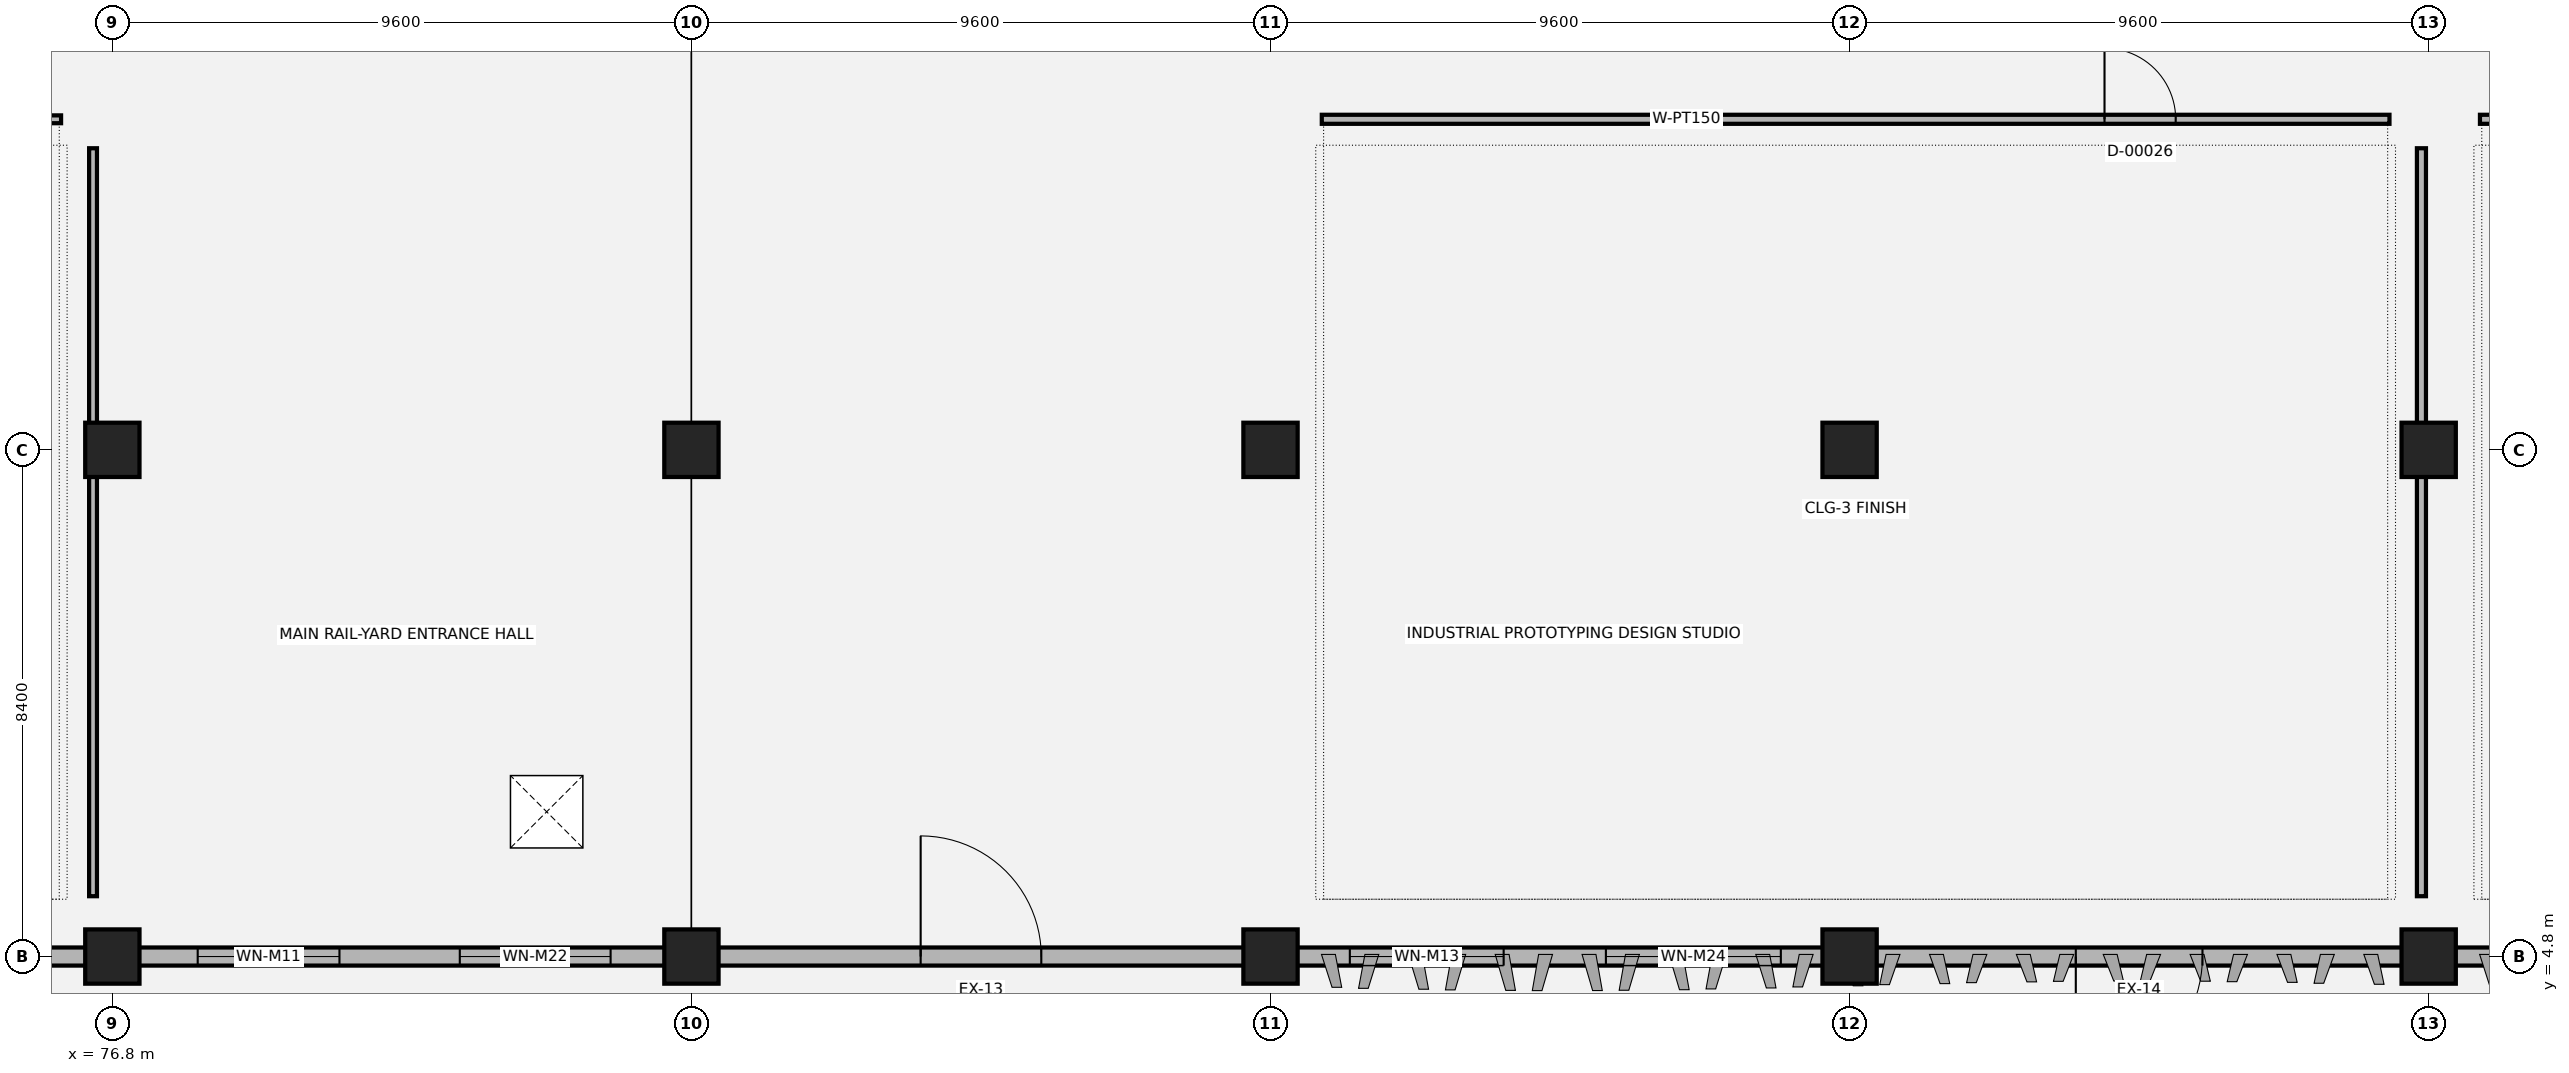
"""IFC4 building model, lengths in metres.
Left out: names, types, materials, properties, quantities, classifications, styles, units other than length and angle.
Written with IfcOpenShell. Run it as: python <this file> out.ifc"""

import sys

from ifc_helpers import new_model, si_unit, direction, frame, frame_2d, origin, origin_2d, place, context, subcontext, project, spatial, rectangle, extrude, element, fill, save


model = new_model("IFC4")
c1 = context("Model", 3, precision=1e-05, world=origin(), true_north=direction((0.0, 1.0)))
c2 = subcontext(c1, "Body", "Model", "MODEL_VIEW")
j1 = project(units=[si_unit("LENGTHUNIT", "METRE"), si_unit("PLANEANGLEUNIT", "RADIAN")], contexts=[c1])
p1 = place(None, origin())
s1 = spatial("IfcSite", under=j1, at=p1, CompositionType="ELEMENT")
p2 = place(p1, origin())
s2 = spatial("IfcBuilding", under=s1, at=p2, CompositionType="ELEMENT")
p3 = place(p2, origin())
s3 = spatial("IfcBuildingStorey", under=s2, at=p3, CompositionType="ELEMENT", Elevation=0.0)
for number, where, z_axis, x_axis in (
    (1, (76.8, 4.8, 0.0), (0.0, 0.0, 1.0), (1.0, 0.0, 0.0)),
    (2, (76.8, 13.2, 0.0), (0.0, 0.0, 1.0), (1.0, 0.0, 0.0)),
    (3, (86.4, 4.8, 0.0), (0.0, 0.0, 1.0), (1.0, 0.0, 0.0)),
    (4, (86.4, 13.2, 0.0), (0.0, 0.0, 1.0), (1.0, 0.0, 0.0)),
    (5, (96.0, 4.8, 0.0), (0.0, 0.0, 1.0), (1.0, 0.0, 0.0)),
    (6, (96.0, 13.2, 0.0), (0.0, 0.0, 1.0), (1.0, 0.0, 0.0)),
    (7, (105.6, 4.8, 0.0), (0.0, 0.0, 1.0), (1.0, 0.0, 0.0)),
    (8, (105.6, 13.2, 0.0), (0.0, 0.0, 1.0), (1.0, 0.0, 0.0)),
    (9, (115.2, 4.8, 0.0), (0.0, 0.0, 1.0), (1.0, 0.0, 0.0)),
    (10, (115.2, 13.2, 0.0), (0.0, 0.0, 1.0), (1.0, 0.0, 0.0)),
):
    element("IfcColumn", number, at=place(p3, frame(where, z_axis=z_axis, x_axis=x_axis)), inside=s3, PredefinedType="COLUMN", context=c2, shape_type="SweptSolid", body=[
        extrude(rectangle(XDim=0.9, YDim=0.9, at=origin_2d()), origin(), (0.0, 0.0, 1.0), 5.4),
    ])
p4 = place(p3, frame((67.58, 4.8, 0.0), z_axis=(0.0, 0.0, 1.0), x_axis=(1.0, 0.0, 0.0)))
e11 = element("IfcWall", 11, at=p4, inside=s3, PredefinedType="SOLIDWALL", context=c2, shape_type="SweptSolid", body=[
    extrude(rectangle(XDim=8.84, YDim=0.3, at=frame_2d((4.42, 0.0))), origin(), (0.0, 0.0, 1.0), 4.04),
])
p5 = place(p4, frame((3.37, 0.0, 0.0)))
e12 = element("IfcOpeningElement", 12, at=p5, cuts=e11, PredefinedType="OPENING", context=c2, shape_type="SweptSolid", body=[
    extrude(rectangle(XDim=2.1, YDim=2.2, at=frame_2d((1.05, 1.1))), frame((0.0, 0.16, 0.0), z_axis=(0.0, -1.0, 0.0), x_axis=(1.0, 0.0, 0.0)), (0.0, 0.0, 1.0), 0.32),
])
p6 = place(p3, frame((77.18, 4.8, 0.0), z_axis=(0.0, 0.0, 1.0), x_axis=(1.0, 0.0, 0.0)))
e13 = element("IfcWall", 13, at=p6, inside=s3, PredefinedType="SOLIDWALL", context=c2, shape_type="SweptSolid", body=[
    extrude(rectangle(XDim=8.84, YDim=0.3, at=frame_2d((4.42, 0.0))), origin(), (0.0, 0.0, 1.0), 4.04),
])
p7 = place(p6, frame((1.035, 0.0, 0.9)))
e14 = element("IfcOpeningElement", 14, at=p7, cuts=e13, PredefinedType="OPENING", context=c2, shape_type="SweptSolid", body=[
    extrude(rectangle(XDim=2.35, YDim=1.7, at=frame_2d((1.175, 0.85))), frame((0.0, 0.16, 0.0), z_axis=(0.0, -1.0, 0.0), x_axis=(1.0, 0.0, 0.0)), (0.0, 0.0, 1.0), 0.32),
])
p8 = place(p6, frame((5.38, 0.0, 0.9)))
e15 = element("IfcOpeningElement", 15, at=p8, cuts=e13, PredefinedType="OPENING", context=c2, shape_type="SweptSolid", body=[
    extrude(rectangle(XDim=2.5, YDim=1.65, at=frame_2d((1.25, 0.825))), frame((0.0, 0.16, 0.0), z_axis=(0.0, -1.0, 0.0), x_axis=(1.0, 0.0, 0.0)), (0.0, 0.0, 1.0), 0.32),
])
p9 = place(p3, frame((86.78, 4.8, 0.0), z_axis=(0.0, 0.0, 1.0), x_axis=(1.0, 0.0, 0.0)))
e16 = element("IfcWall", 16, at=p9, inside=s3, PredefinedType="SOLIDWALL", context=c2, shape_type="SweptSolid", body=[
    extrude(rectangle(XDim=8.84, YDim=0.3, at=frame_2d((4.42, 0.0))), origin(), (0.0, 0.0, 1.0), 4.04),
])
p10 = place(p9, frame((3.42, 0.0, 0.0)))
e17 = element("IfcOpeningElement", 17, at=p10, cuts=e16, PredefinedType="OPENING", context=c2, shape_type="SweptSolid", body=[
    extrude(rectangle(XDim=2.0, YDim=2.2, at=frame_2d((1.0, 1.1))), frame((0.0, 0.16, 0.0), z_axis=(0.0, -1.0, 0.0), x_axis=(1.0, 0.0, 0.0)), (0.0, 0.0, 1.0), 0.32),
])
p11 = place(p3, frame((96.38, 4.8, 0.0), z_axis=(0.0, 0.0, 1.0), x_axis=(1.0, 0.0, 0.0)))
e18 = element("IfcWall", 18, at=p11, inside=s3, PredefinedType="SOLIDWALL", context=c2, shape_type="SweptSolid", body=[
    extrude(rectangle(XDim=8.84, YDim=0.3, at=frame_2d((4.42, 0.0))), origin(), (0.0, 0.0, 1.0), 4.04),
])
p12 = place(p11, frame((0.935, 0.0, 0.9)))
e19 = element("IfcOpeningElement", 19, at=p12, cuts=e18, PredefinedType="OPENING", context=c2, shape_type="SweptSolid", body=[
    extrude(rectangle(XDim=2.55, YDim=1.75, at=frame_2d((1.275, 0.875))), frame((0.0, 0.16, 0.0), z_axis=(0.0, -1.0, 0.0), x_axis=(1.0, 0.0, 0.0)), (0.0, 0.0, 1.0), 0.32),
])
p13 = place(p11, frame((5.18, 0.0, 0.9)))
e20 = element("IfcOpeningElement", 20, at=p13, cuts=e18, PredefinedType="OPENING", context=c2, shape_type="SweptSolid", body=[
    extrude(rectangle(XDim=2.9, YDim=1.75, at=frame_2d((1.45, 0.875))), frame((0.0, 0.16, 0.0), z_axis=(0.0, -1.0, 0.0), x_axis=(1.0, 0.0, 0.0)), (0.0, 0.0, 1.0), 0.32),
])
p14 = place(p3, frame((105.98, 4.8, 0.0), z_axis=(0.0, 0.0, 1.0), x_axis=(1.0, 0.0, 0.0)))
e21 = element("IfcWall", 21, at=p14, inside=s3, PredefinedType="SOLIDWALL", context=c2, shape_type="SweptSolid", body=[
    extrude(rectangle(XDim=8.84, YDim=0.3, at=frame_2d((4.42, 0.0))), origin(), (0.0, 0.0, 1.0), 4.04),
])
p15 = place(p14, frame((3.37, 0.0, 0.0)))
e22 = element("IfcOpeningElement", 22, at=p15, cuts=e21, PredefinedType="OPENING", context=c2, shape_type="SweptSolid", body=[
    extrude(rectangle(XDim=2.1, YDim=2.2, at=frame_2d((1.05, 1.1))), frame((0.0, 0.16, 0.0), z_axis=(0.0, -1.0, 0.0), x_axis=(1.0, 0.0, 0.0)), (0.0, 0.0, 1.0), 0.32),
])
p16 = place(p3, frame((115.58, 4.8, 0.0), z_axis=(0.0, 0.0, 1.0), x_axis=(1.0, 0.0, 0.0)))
e23 = element("IfcWall", 23, at=p16, inside=s3, PredefinedType="SOLIDWALL", context=c2, shape_type="SweptSolid", body=[
    extrude(rectangle(XDim=4.04, YDim=0.3, at=frame_2d((2.02, 0.0))), origin(), (0.0, 0.0, 1.0), 4.04),
])
p17 = place(p3, frame((57.25, 18.68, 0.0), z_axis=(0.0, 0.0, 1.0), x_axis=(1.0, 0.0, 0.0)))
e24 = element("IfcWall", 24, at=p17, inside=s3, PredefinedType="PARTITIONING", context=c2, shape_type="SweptSolid", body=[
    extrude(rectangle(XDim=18.7, YDim=0.13, at=frame_2d((9.35, 0.0))), origin(), (0.0, 0.0, 1.0), 4.04),
])
p18 = place(p17, frame((13.936, 0.0, 0.0)))
e25 = element("IfcOpeningElement", 25, at=p18, cuts=e24, PredefinedType="OPENING", context=c2, shape_type="SweptSolid", body=[
    extrude(rectangle(XDim=0.98, YDim=2.1, at=frame_2d((0.49, 1.05))), frame((0.0, 0.075, 0.0), z_axis=(0.0, -1.0, 0.0), x_axis=(1.0, 0.0, 0.0)), (0.0, 0.0, 1.0), 0.15),
])
p19 = place(p3, frame((76.48, 5.8, 0.0), z_axis=(0.0, 0.0, 1.0), x_axis=(0.0, 1.0, 0.0)))
e26 = element("IfcWall", 26, at=p19, inside=s3, PredefinedType="PARTITIONING", context=c2, shape_type="SweptSolid", body=[
    extrude(rectangle(XDim=12.4, YDim=0.13, at=frame_2d((6.2, 0.0))), origin(), (0.0, 0.0, 1.0), 4.04),
])
p20 = place(p3, frame((96.85, 18.68, 0.0), z_axis=(0.0, 0.0, 1.0), x_axis=(1.0, 0.0, 0.0)))
e27 = element("IfcWall", 27, at=p20, inside=s3, PredefinedType="PARTITIONING", context=c2, shape_type="SweptSolid", body=[
    extrude(rectangle(XDim=17.7, YDim=0.15, at=frame_2d((8.85, 0.0))), origin(), (0.0, 0.0, 1.0), 4.04),
])
p21 = place(p20, frame((12.976, 0.0, 0.0)))
e28 = element("IfcOpeningElement", 28, at=p21, cuts=e27, PredefinedType="OPENING", context=c2, shape_type="SweptSolid", body=[
    extrude(rectangle(XDim=1.18, YDim=2.15, at=frame_2d((0.59, 1.075))), frame((0.0, 0.085, 0.0), z_axis=(0.0, -1.0, 0.0), x_axis=(1.0, 0.0, 0.0)), (0.0, 0.0, 1.0), 0.17),
])
p22 = place(p3, frame((115.08, 5.8, 0.0), z_axis=(0.0, 0.0, 1.0), x_axis=(0.0, 1.0, 0.0)))
e29 = element("IfcWall", 29, at=p22, inside=s3, PredefinedType="PARTITIONING", context=c2, shape_type="SweptSolid", body=[
    extrude(rectangle(XDim=12.4, YDim=0.15, at=frame_2d((6.2, 0.0))), origin(), (0.0, 0.0, 1.0), 4.04),
])
p23 = place(p3, frame((116.05, 18.68, 0.0), z_axis=(0.0, 0.0, 1.0), x_axis=(1.0, 0.0, 0.0)))
e30 = element("IfcWall", 30, at=p23, inside=s3, PredefinedType="PARTITIONING", context=c2, shape_type="SweptSolid", body=[
    extrude(rectangle(XDim=17.3, YDim=0.15, at=frame_2d((8.65, 0.0))), origin(), (0.0, 0.0, 1.0), 4.04),
])
p24 = place(p23, frame((12.704, 0.0, 0.0)))
e31 = element("IfcOpeningElement", 31, at=p24, cuts=e30, PredefinedType="OPENING", context=c2, shape_type="SweptSolid", body=[
    extrude(rectangle(XDim=1.12, YDim=2.15, at=frame_2d((0.56, 1.075))), frame((0.0, 0.085, 0.0), z_axis=(0.0, -1.0, 0.0), x_axis=(1.0, 0.0, 0.0)), (0.0, 0.0, 1.0), 0.17),
])
p25 = place(p7, origin())
e32 = element("IfcWindow", 32, at=p25, inside=s3, PartitioningType="SINGLE_PANEL", PredefinedType="WINDOW", context=c2, shape_type="SweptSolid", body=[
    extrude(rectangle(XDim=2.35, YDim=1.7, at=frame_2d((1.175, 0.85))), frame((0.0, 0.03, 0.0), z_axis=(0.0, -1.0, 0.0), x_axis=(1.0, 0.0, 0.0)), (0.0, 0.0, 1.0), 0.06),
])
fill(e14, e32)
p26 = place(p8, origin())
e33 = element("IfcWindow", 33, at=p26, inside=s3, PartitioningType="SINGLE_PANEL", PredefinedType="WINDOW", context=c2, shape_type="SweptSolid", body=[
    extrude(rectangle(XDim=2.5, YDim=1.65, at=frame_2d((1.25, 0.825))), frame((0.0, 0.03, 0.0), z_axis=(0.0, -1.0, 0.0), x_axis=(1.0, 0.0, 0.0)), (0.0, 0.0, 1.0), 0.06),
])
fill(e15, e33)
p27 = place(p10, origin())
e34 = element("IfcDoor", 34, at=p27, inside=s3, OperationType="SINGLE_SWING_LEFT", PredefinedType="DOOR", context=c2, shape_type="SweptSolid", body=[
    extrude(rectangle(XDim=2.0, YDim=2.2, at=frame_2d((1.0, 1.1))), frame((0.0, 0.025, 0.0), z_axis=(0.0, -1.0, 0.0), x_axis=(1.0, 0.0, 0.0)), (0.0, 0.0, 1.0), 0.05),
])
fill(e17, e34)
p28 = place(p12, origin())
e35 = element("IfcWindow", 35, at=p28, inside=s3, PartitioningType="SINGLE_PANEL", PredefinedType="WINDOW", context=c2, shape_type="SweptSolid", body=[
    extrude(rectangle(XDim=2.55, YDim=1.75, at=frame_2d((1.275, 0.875))), frame((0.0, 0.03, 0.0), z_axis=(0.0, -1.0, 0.0), x_axis=(1.0, 0.0, 0.0)), (0.0, 0.0, 1.0), 0.06),
])
fill(e19, e35)
p29 = place(p13, origin())
e36 = element("IfcWindow", 36, at=p29, inside=s3, PartitioningType="SINGLE_PANEL", PredefinedType="WINDOW", context=c2, shape_type="SweptSolid", body=[
    extrude(rectangle(XDim=2.9, YDim=1.75, at=frame_2d((1.45, 0.875))), frame((0.0, 0.03, 0.0), z_axis=(0.0, -1.0, 0.0), x_axis=(1.0, 0.0, 0.0)), (0.0, 0.0, 1.0), 0.06),
])
fill(e20, e36)
p30 = place(p15, origin())
e37 = element("IfcDoor", 37, at=p30, inside=s3, OperationType="SINGLE_SWING_RIGHT", PredefinedType="DOOR", context=c2, shape_type="SweptSolid", body=[
    extrude(rectangle(XDim=2.1, YDim=2.2, at=frame_2d((1.05, 1.1))), frame((0.0, 0.025, 0.0), z_axis=(0.0, -1.0, 0.0), x_axis=(1.0, 0.0, 0.0)), (0.0, 0.0, 1.0), 0.05),
])
fill(e22, e37)
p31 = place(p21, origin())
e38 = element("IfcDoor", 38, at=p31, inside=s3, OperationType="SINGLE_SWING_LEFT", PredefinedType="DOOR", context=c2, shape_type="SweptSolid", body=[
    extrude(rectangle(XDim=1.18, YDim=2.15, at=frame_2d((0.59, 1.075))), frame((0.0, 0.025, 0.0), z_axis=(0.0, -1.0, 0.0), x_axis=(1.0, 0.0, 0.0)), (0.0, 0.0, 1.0), 0.05),
])
fill(e28, e38)
save(model, sys.argv[1])
